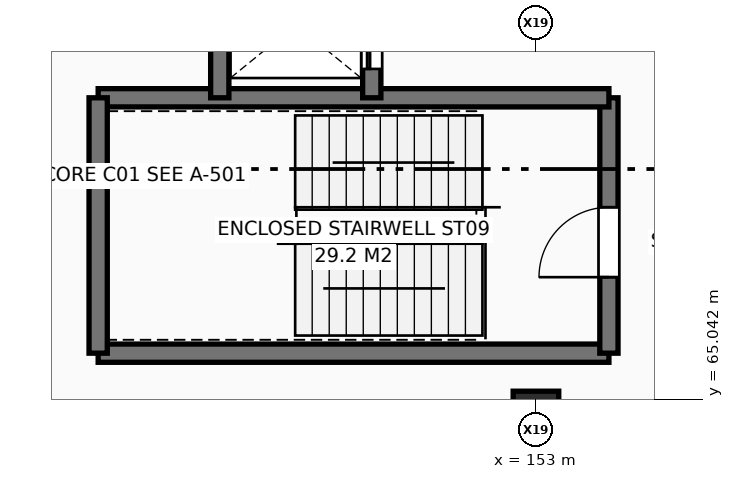
"""IFC4 building model, lengths in metres.
Left out: names, types, materials, properties, quantities, classifications, styles, units other than length and angle.
Written with IfcOpenShell. Run it as: python <this file> out.ifc"""

import sys

from ifc_helpers import new_model, si_unit, direction, frame, frame_2d, origin, origin_2d, place, context, subcontext, project, spatial, rectangle, extrude, element, fill, save


model = new_model("IFC4")
c1 = context("Model", 3, precision=1e-05, world=origin(), true_north=direction((0.0, 1.0)))
c2 = subcontext(c1, "Body", "Model", "MODEL_VIEW")
j1 = project(units=[si_unit("LENGTHUNIT", "METRE"), si_unit("PLANEANGLEUNIT", "RADIAN")], contexts=[c1])
p1 = place(None, origin())
s1 = spatial("IfcSite", under=j1, at=p1, CompositionType="ELEMENT")
p2 = place(p1, origin())
s2 = spatial("IfcBuilding", under=s1, at=p2, CompositionType="ELEMENT")
p3 = place(p2, frame((0.0, 0.0, 5.4)))
s3 = spatial("IfcBuildingStorey", under=s2, at=p3, CompositionType="ELEMENT", Elevation=5.4)
p4 = place(p3, frame((153.0, 64.8, 0.0), z_axis=(0.0, 0.0, 1.0), x_axis=(1.0, 0.0, 0.0)))
e1 = element("IfcColumn", 1, at=p4, inside=s3, PredefinedType="COLUMN", context=c2, shape_type="SweptSolid", body=[
    extrude(rectangle(XDim=0.75, YDim=0.75, at=origin_2d()), origin(), (0.0, 0.0, 1.0), 4.2),
])
p5 = place(p3, frame((145.8, 65.8, 0.0), z_axis=(0.0, 0.0, 1.0), x_axis=(1.0, 0.0, 0.0)))
e2 = element("IfcWall", 2, at=p5, inside=s3, PredefinedType="SHEAR", context=c2, shape_type="SweptSolid", body=[
    extrude(rectangle(XDim=8.4, YDim=0.3, at=frame_2d((4.2, 0.0))), origin(), (0.0, 0.0, 1.0), 3.92),
])
p6 = place(p3, frame((154.2, 65.8, 0.0), z_axis=(0.0, 0.0, 1.0), x_axis=(0.0, 1.0, 0.0)))
e3 = element("IfcWall", 3, at=p6, inside=s3, PredefinedType="SHEAR", context=c2, shape_type="SweptSolid", body=[
    extrude(rectangle(XDim=4.2, YDim=0.3, at=frame_2d((2.1, 0.0))), origin(), (0.0, 0.0, 1.0), 3.92),
])
p7 = place(p6, frame((1.25, 0.0, 0.0)))
e4 = element("IfcOpeningElement", 4, at=p7, cuts=e3, PredefinedType="OPENING", context=c2, shape_type="SweptSolid", body=[
    extrude(rectangle(XDim=1.15, YDim=2.2, at=frame_2d((0.575, 1.1))), frame((0.0, 0.16, 0.0), z_axis=(0.0, -1.0, 0.0), x_axis=(1.0, 0.0, 0.0)), (0.0, 0.0, 1.0), 0.32),
])
p8 = place(p3, frame((154.2, 70.0, 0.0), z_axis=(0.0, 0.0, 1.0), x_axis=(-1.0, 0.0, 0.0)))
e5 = element("IfcWall", 5, at=p8, inside=s3, PredefinedType="SHEAR", context=c2, shape_type="SweptSolid", body=[
    extrude(rectangle(XDim=8.4, YDim=0.3, at=frame_2d((4.2, 0.0))), origin(), (0.0, 0.0, 1.0), 3.92),
])
p9 = place(p3, frame((145.8, 70.0, 0.0), z_axis=(0.0, 0.0, 1.0), x_axis=(0.0, -1.0, 0.0)))
e6 = element("IfcWall", 6, at=p9, inside=s3, PredefinedType="SHEAR", context=c2, shape_type="SweptSolid", body=[
    extrude(rectangle(XDim=4.2, YDim=0.3, at=frame_2d((2.1, 0.0))), origin(), (0.0, 0.0, 1.0), 3.92),
])
p10 = place(p3, frame((147.8, 72.4, 0.0), z_axis=(0.0, 0.0, 1.0), x_axis=(0.0, -1.0, 0.0)))
e7 = element("IfcWall", 7, at=p10, inside=s3, PredefinedType="SHEAR", context=c2, shape_type="SweptSolid", body=[
    extrude(rectangle(XDim=2.4, YDim=0.3, at=frame_2d((1.2, 0.0))), origin(), (0.0, 0.0, 1.0), 3.92),
])
p11 = place(p3, frame((150.3, 70.0, 0.0), z_axis=(0.0, 0.0, 1.0), x_axis=(0.0, 1.0, 0.0)))
e8 = element("IfcWall", 8, at=p11, inside=s3, PredefinedType="SHEAR", context=c2, shape_type="SweptSolid", body=[
    extrude(rectangle(XDim=2.4, YDim=0.3, at=frame_2d((1.2, 0.0))), origin(), (0.0, 0.0, 1.0), 3.92),
])
p12 = place(p11, frame((0.475, 0.0, 0.0)))
e9 = element("IfcOpeningElement", 9, at=p12, cuts=e8, PredefinedType="OPENING", context=c2, shape_type="SweptSolid", body=[
    extrude(rectangle(XDim=1.45, YDim=2.35, at=frame_2d((0.725, 1.175))), frame((0.0, 0.16, 0.0), z_axis=(0.0, -1.0, 0.0), x_axis=(1.0, 0.0, 0.0)), (0.0, 0.0, 1.0), 0.32),
])
p13 = place(p7, origin())
e10 = element("IfcDoor", 10, at=p13, inside=s3, OperationType="SINGLE_SWING_LEFT", PredefinedType="DOOR", context=c2, shape_type="SweptSolid", body=[
    extrude(rectangle(XDim=1.15, YDim=2.2, at=frame_2d((0.575, 1.1))), frame((0.0, 0.025, 0.0), z_axis=(0.0, -1.0, 0.0), x_axis=(1.0, 0.0, 0.0)), (0.0, 0.0, 1.0), 0.05),
])
fill(e4, e10)
p14 = place(p12, origin())
e11 = element("IfcDoor", 11, at=p14, inside=s3, OperationType="SLIDING_TO_LEFT", PredefinedType="DOOR", context=c2, shape_type="SweptSolid", body=[
    extrude(rectangle(XDim=1.45, YDim=2.35, at=frame_2d((0.725, 1.175))), frame((0.0, 0.025, 0.0), z_axis=(0.0, -1.0, 0.0), x_axis=(1.0, 0.0, 0.0)), (0.0, 0.0, 1.0), 0.05),
])
fill(e9, e11)
save(model, sys.argv[1])
